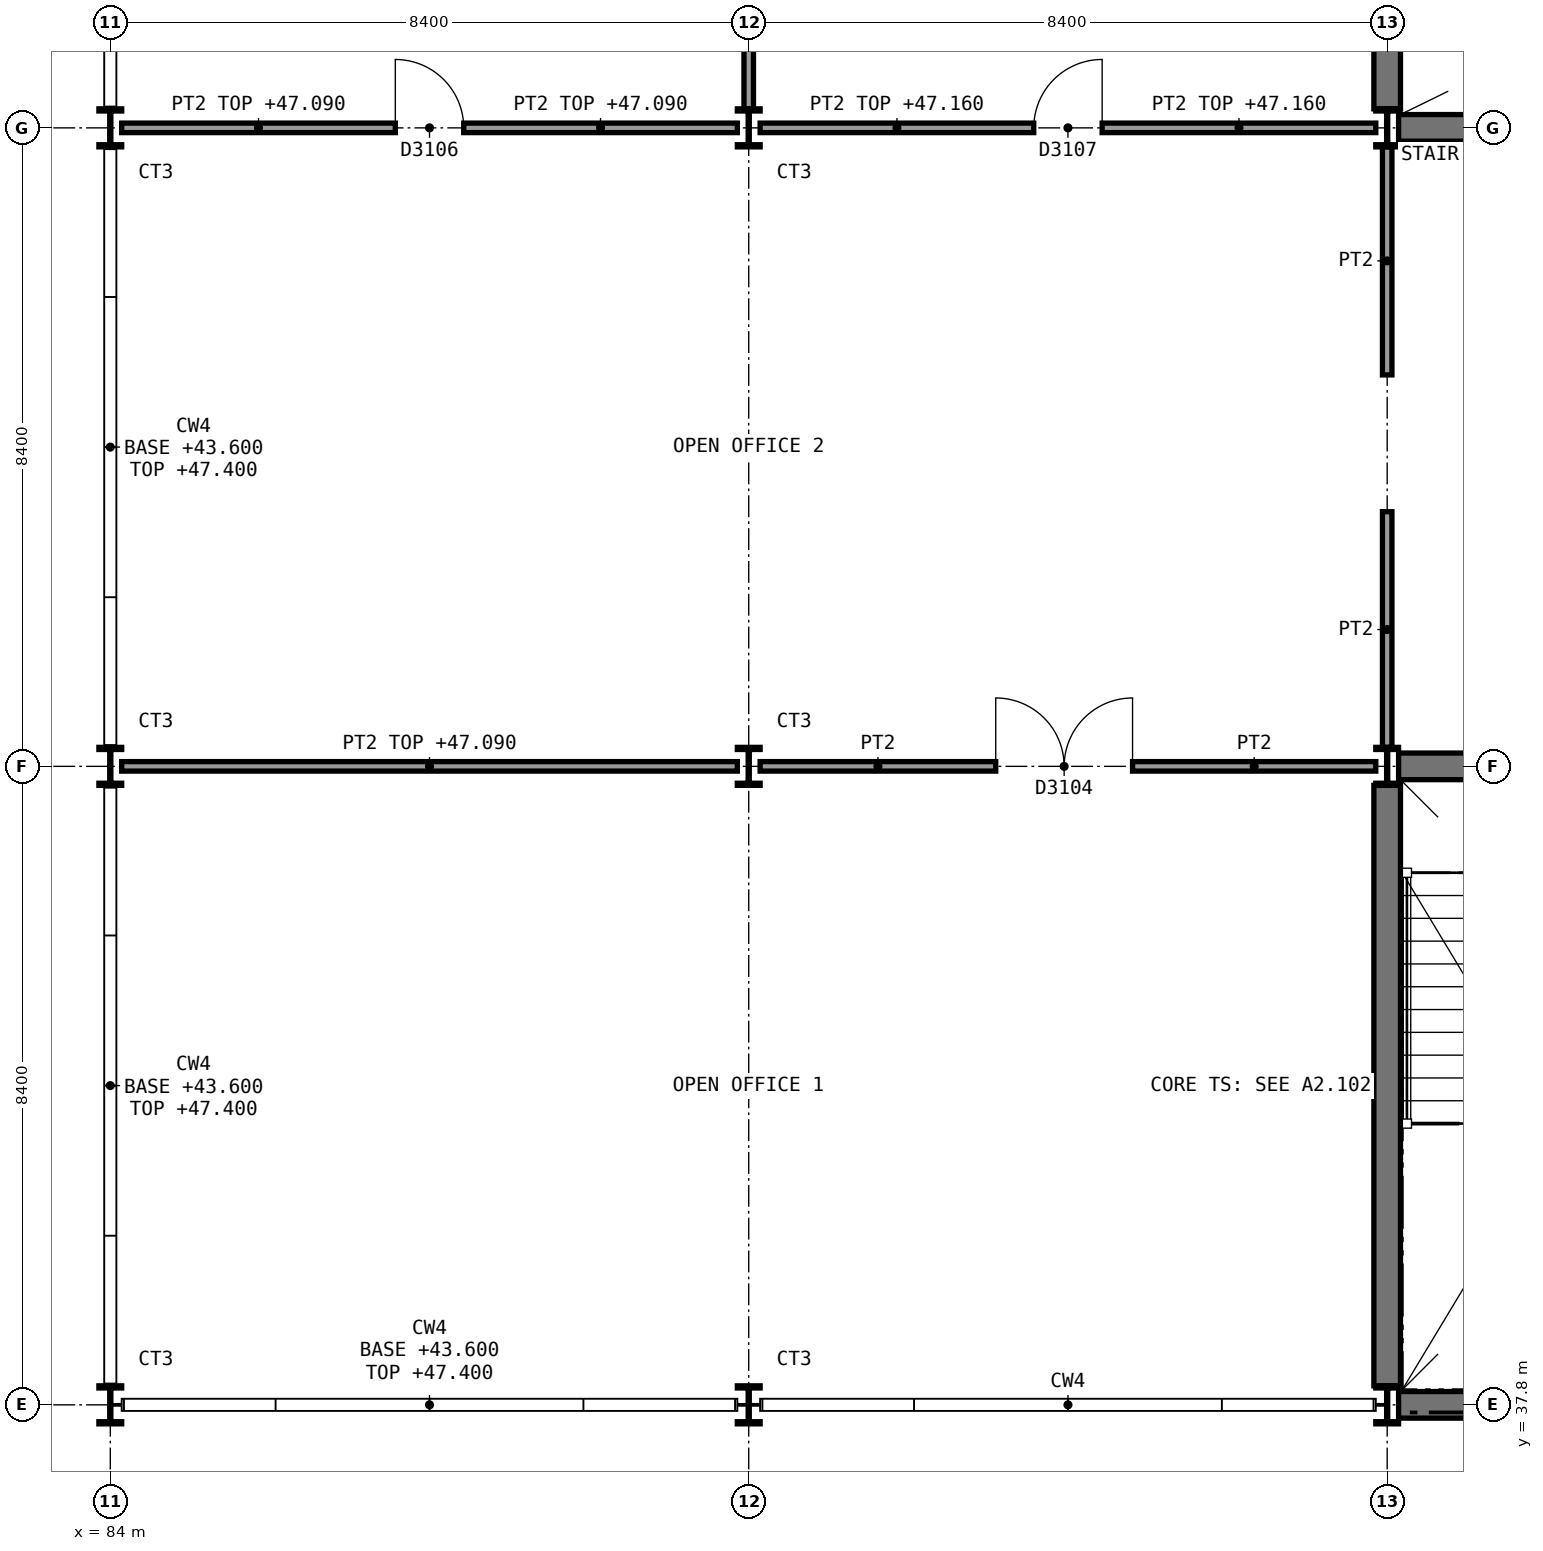
"""IFC4 building model, lengths in metres.
Left out: names, types, materials, properties, quantities, classifications, styles, units other than length and angle.
Written with IfcOpenShell. Run it as: python <this file> out.ifc"""

import sys

from ifc_helpers import new_model, si_unit, direction, frame, frame_2d, origin, origin_2d, place, context, subcontext, project, spatial, rectangle, i_section, extrude, element, fill, save


model = new_model("IFC4")
c1 = context("Model", 3, precision=1e-05, world=origin(), true_north=direction((0.0, 1.0)))
c2 = subcontext(c1, "Body", "Model", "MODEL_VIEW")
j1 = project(units=[si_unit("LENGTHUNIT", "METRE"), si_unit("PLANEANGLEUNIT", "RADIAN")], contexts=[c1])
p1 = place(None, origin())
s1 = spatial("IfcSite", under=j1, at=p1, CompositionType="ELEMENT")
p2 = place(p1, origin())
s2 = spatial("IfcBuilding", under=s1, at=p2, CompositionType="ELEMENT")
p3 = place(p2, frame((0.0, 0.0, 43.6)))
s3 = spatial("IfcBuildingStorey", under=s2, at=p3, CompositionType="ELEMENT", Elevation=43.6)
p4 = place(p3, frame((100.95, 54.6, 0.0), z_axis=(0.0, 0.0, 1.0), x_axis=(1.0, 0.0, 0.0)))
e1 = element("IfcWall", 1, at=p4, inside=s3, PredefinedType="SHEAR", context=c2, shape_type="SweptSolid", body=[
    extrude(rectangle(XDim=16.4, YDim=0.35, at=frame_2d((8.2, 0.0))), origin(), (0.0, 0.0, 1.0), 3.85),
])
p5 = place(p4, frame((1.15, 0.0, 0.0)))
e2 = element("IfcOpeningElement", 2, at=p5, cuts=e1, PredefinedType="OPENING", context=c2, shape_type="SweptSolid", body=[
    extrude(rectangle(XDim=1.8, YDim=2.1, at=frame_2d((0.9, 1.05))), frame((0.0, 0.185, 0.0), z_axis=(0.0, -1.0, 0.0), x_axis=(1.0, 0.0, 0.0)), (0.0, 0.0, 1.0), 0.37),
])
p6 = place(p4, frame((13.55, 0.0, 0.0)))
e3 = element("IfcOpeningElement", 3, at=p6, cuts=e1, PredefinedType="OPENING", context=c2, shape_type="SweptSolid", body=[
    extrude(rectangle(XDim=1.8, YDim=2.1, at=frame_2d((0.9, 1.05))), frame((0.0, 0.185, 0.0), z_axis=(0.0, -1.0, 0.0), x_axis=(1.0, 0.0, 0.0)), (0.0, 0.0, 1.0), 0.37),
])
p7 = place(p4, frame((7.05, 0.0, 0.0)))
e4 = element("IfcOpeningElement", 4, at=p7, cuts=e1, PredefinedType="OPENING", context=c2, shape_type="SweptSolid", body=[
    extrude(rectangle(XDim=2.4, YDim=2.4, at=frame_2d((1.2, 1.2))), frame((0.0, 0.185, 0.0), z_axis=(0.0, -1.0, 0.0), x_axis=(1.0, 0.0, 0.0)), (0.0, 0.0, 1.0), 0.37),
])
p8 = place(p3, frame((100.8, 54.85, 0.0), z_axis=(0.0, 0.0, 1.0), x_axis=(0.0, 1.0, 0.0)))
e5 = element("IfcWall", 5, at=p8, inside=s3, PredefinedType="SHEAR", context=c2, shape_type="SweptSolid", body=[
    extrude(rectangle(XDim=7.9, YDim=0.35, at=frame_2d((3.95, 0.0))), origin(), (0.0, 0.0, 1.0), 3.85),
])
p9 = place(p3, frame((100.95, 37.8, 0.0), z_axis=(0.0, 0.0, 1.0), x_axis=(1.0, 0.0, 0.0)))
e6 = element("IfcWall", 6, at=p9, inside=s3, PredefinedType="SHEAR", context=c2, shape_type="SweptSolid", body=[
    extrude(rectangle(XDim=8.1, YDim=0.35, at=frame_2d((4.05, 0.0))), origin(), (0.0, 0.0, 1.0), 3.85),
])
p10 = place(p3, frame((100.95, 46.2, 0.0), z_axis=(0.0, 0.0, 1.0), x_axis=(1.0, 0.0, 0.0)))
e7 = element("IfcWall", 7, at=p10, inside=s3, PredefinedType="SHEAR", context=c2, shape_type="SweptSolid", body=[
    extrude(rectangle(XDim=8.1, YDim=0.35, at=frame_2d((4.05, 0.0))), origin(), (0.0, 0.0, 1.0), 3.85),
])
p11 = place(p10, frame((1.15, 0.0, 0.0)))
e8 = element("IfcOpeningElement", 8, at=p11, cuts=e7, PredefinedType="OPENING", context=c2, shape_type="SweptSolid", body=[
    extrude(rectangle(XDim=1.8, YDim=2.1, at=frame_2d((0.9, 1.05))), frame((0.0, 0.185, 0.0), z_axis=(0.0, -1.0, 0.0), x_axis=(1.0, 0.0, 0.0)), (0.0, 0.0, 1.0), 0.37),
])
p12 = place(p10, frame((5.6, 0.0, 0.0)))
e9 = element("IfcOpeningElement", 9, at=p12, cuts=e7, PredefinedType="OPENING", context=c2, shape_type="SweptSolid", body=[
    extrude(rectangle(XDim=1.2, YDim=2.1, at=frame_2d((0.6, 1.05))), frame((0.0, 0.185, 0.0), z_axis=(0.0, -1.0, 0.0), x_axis=(1.0, 0.0, 0.0)), (0.0, 0.0, 1.0), 0.37),
])
p13 = place(p3, frame((100.8, 38.05, 0.0), z_axis=(0.0, 0.0, 1.0), x_axis=(0.0, 1.0, 0.0)))
e10 = element("IfcWall", 10, at=p13, inside=s3, PredefinedType="SHEAR", context=c2, shape_type="SweptSolid", body=[
    extrude(rectangle(XDim=7.9, YDim=0.35, at=frame_2d((3.95, 0.0))), origin(), (0.0, 0.0, 1.0), 3.85),
])
for number, where, z_axis, x_axis in (
    (11, (84.0, 37.8, 0.0), (0.0, 0.0, 1.0), (1.0, 0.0, 0.0)),
    (12, (84.0, 46.2, 0.0), (0.0, 0.0, 1.0), (1.0, 0.0, 0.0)),
    (13, (84.0, 54.6, 0.0), (0.0, 0.0, 1.0), (1.0, 0.0, 0.0)),
    (14, (92.4, 37.8, 0.0), (0.0, 0.0, 1.0), (1.0, 0.0, 0.0)),
    (15, (92.4, 46.2, 0.0), (0.0, 0.0, 1.0), (1.0, 0.0, 0.0)),
    (16, (92.4, 54.6, 0.0), (0.0, 0.0, 1.0), (1.0, 0.0, 0.0)),
    (17, (100.8, 37.8, 0.0), (0.0, 0.0, 1.0), (1.0, 0.0, 0.0)),
    (18, (100.8, 46.2, 0.0), (0.0, 0.0, 1.0), (1.0, 0.0, 0.0)),
    (19, (100.8, 54.6, 0.0), (0.0, 0.0, 1.0), (1.0, 0.0, 0.0)),
):
    element("IfcColumn", number, at=place(p3, frame(where, z_axis=z_axis, x_axis=x_axis)), inside=s3, PredefinedType="COLUMN", context=c2, shape_type="SweptSolid", body=[
        extrude(i_section(OverallWidth=0.3, OverallDepth=0.5, WebThickness=0.014, FlangeThickness=0.028, FilletRadius=0.027, at=origin_2d()), origin(), (0.0, 0.0, 1.0), 4.0),
    ])
p14 = place(p3, frame((84.15, 46.2, 0.0), z_axis=(0.0, 0.0, 1.0), x_axis=(1.0, 0.0, 0.0)))
e20 = element("IfcWall", 20, at=p14, inside=s3, PredefinedType="PARTITIONING", context=c2, shape_type="SweptSolid", body=[
    extrude(rectangle(XDim=8.1, YDim=0.125, at=frame_2d((4.05, 0.0))), origin(), (0.0, 0.0, 1.0), 3.49),
])
p15 = place(p3, frame((92.55, 46.2, 0.0), z_axis=(0.0, 0.0, 1.0), x_axis=(1.0, 0.0, 0.0)))
e21 = element("IfcWall", 21, at=p15, inside=s3, PredefinedType="PARTITIONING", context=c2, shape_type="SweptSolid", body=[
    extrude(rectangle(XDim=8.1, YDim=0.125, at=frame_2d((4.05, 0.0))), origin(), (0.0, 0.0, 1.0), 3.5),
])
p16 = place(p15, frame((3.1, 0.0, 0.0)))
e22 = element("IfcOpeningElement", 22, at=p16, cuts=e21, PredefinedType="OPENING", context=c2, shape_type="SweptSolid", body=[
    extrude(rectangle(XDim=1.8, YDim=2.1, at=frame_2d((0.9, 1.05))), frame((0.0, 0.073, 0.0), z_axis=(0.0, -1.0, 0.0), x_axis=(1.0, 0.0, 0.0)), (0.0, 0.0, 1.0), 0.145),
])
p17 = place(p3, frame((100.8, 46.45, 0.0), z_axis=(0.0, 0.0, 1.0), x_axis=(0.0, 1.0, 0.0)))
e23 = element("IfcWall", 23, at=p17, inside=s3, PredefinedType="PARTITIONING", context=c2, shape_type="SweptSolid", body=[
    extrude(rectangle(XDim=3.1, YDim=0.125, at=frame_2d((1.55, 0.0))), origin(), (0.0, 0.0, 1.0), 3.5),
])
p18 = place(p3, frame((100.8, 51.35, 0.0), z_axis=(0.0, 0.0, 1.0), x_axis=(0.0, 1.0, 0.0)))
e24 = element("IfcWall", 24, at=p18, inside=s3, PredefinedType="PARTITIONING", context=c2, shape_type="SweptSolid", body=[
    extrude(rectangle(XDim=3.0, YDim=0.125, at=frame_2d((1.5, 0.0))), origin(), (0.0, 0.0, 1.0), 3.5),
])
p19 = place(p3, frame((84.15, 54.6, 0.0), z_axis=(0.0, 0.0, 1.0), x_axis=(1.0, 0.0, 0.0)))
e25 = element("IfcWall", 25, at=p19, inside=s3, PredefinedType="PARTITIONING", context=c2, shape_type="SweptSolid", body=[
    extrude(rectangle(XDim=8.1, YDim=0.125, at=frame_2d((4.05, 0.0))), origin(), (0.0, 0.0, 1.0), 3.49),
])
p20 = place(p19, frame((3.6, 0.0, 0.0)))
e26 = element("IfcOpeningElement", 26, at=p20, cuts=e25, PredefinedType="OPENING", context=c2, shape_type="SweptSolid", body=[
    extrude(rectangle(XDim=0.9, YDim=2.1, at=frame_2d((0.45, 1.05))), frame((0.0, 0.073, 0.0), z_axis=(0.0, -1.0, 0.0), x_axis=(1.0, 0.0, 0.0)), (0.0, 0.0, 1.0), 0.145),
])
p21 = place(p3, frame((92.55, 54.6, 0.0), z_axis=(0.0, 0.0, 1.0), x_axis=(1.0, 0.0, 0.0)))
e27 = element("IfcWall", 27, at=p21, inside=s3, PredefinedType="PARTITIONING", context=c2, shape_type="SweptSolid", body=[
    extrude(rectangle(XDim=8.1, YDim=0.125, at=frame_2d((4.05, 0.0))), origin(), (0.0, 0.0, 1.0), 3.56),
])
p22 = place(p21, frame((3.6, 0.0, 0.0)))
e28 = element("IfcOpeningElement", 28, at=p22, cuts=e27, PredefinedType="OPENING", context=c2, shape_type="SweptSolid", body=[
    extrude(rectangle(XDim=0.9, YDim=2.1, at=frame_2d((0.45, 1.05))), frame((0.0, 0.073, 0.0), z_axis=(0.0, -1.0, 0.0), x_axis=(1.0, 0.0, 0.0)), (0.0, 0.0, 1.0), 0.145),
])
p23 = place(p3, frame((92.4, 54.85, 0.0), z_axis=(0.0, 0.0, 1.0), x_axis=(0.0, 1.0, 0.0)))
e29 = element("IfcWall", 29, at=p23, inside=s3, PredefinedType="PARTITIONING", context=c2, shape_type="SweptSolid", body=[
    extrude(rectangle(XDim=7.9, YDim=0.125, at=frame_2d((3.95, 0.0))), origin(), (0.0, 0.0, 1.0), 3.41),
])
p24 = place(p16, origin())
e30 = element("IfcDoor", 30, at=p24, inside=s3, OperationType="DOUBLE_DOOR_SINGLE_SWING", PredefinedType="DOOR", context=c2, shape_type="SweptSolid", body=[
    extrude(rectangle(XDim=1.8, YDim=2.1, at=frame_2d((0.9, 1.05))), frame((0.0, 0.025, 0.0), z_axis=(0.0, -1.0, 0.0), x_axis=(1.0, 0.0, 0.0)), (0.0, 0.0, 1.0), 0.05),
])
fill(e22, e30)
p25 = place(p20, origin())
e31 = element("IfcDoor", 31, at=p25, inside=s3, OperationType="SINGLE_SWING_LEFT", PredefinedType="DOOR", context=c2, shape_type="SweptSolid", body=[
    extrude(rectangle(XDim=0.9, YDim=2.1, at=frame_2d((0.45, 1.05))), frame((0.0, 0.025, 0.0), z_axis=(0.0, -1.0, 0.0), x_axis=(1.0, 0.0, 0.0)), (0.0, 0.0, 1.0), 0.05),
])
fill(e26, e31)
p26 = place(p22, origin())
e32 = element("IfcDoor", 32, at=p26, inside=s3, OperationType="SINGLE_SWING_RIGHT", PredefinedType="DOOR", context=c2, shape_type="SweptSolid", body=[
    extrude(rectangle(XDim=0.9, YDim=2.1, at=frame_2d((0.45, 1.05))), frame((0.0, 0.025, 0.0), z_axis=(0.0, -1.0, 0.0), x_axis=(1.0, 0.0, 0.0)), (0.0, 0.0, 1.0), 0.05),
])
fill(e28, e32)
save(model, sys.argv[1])
